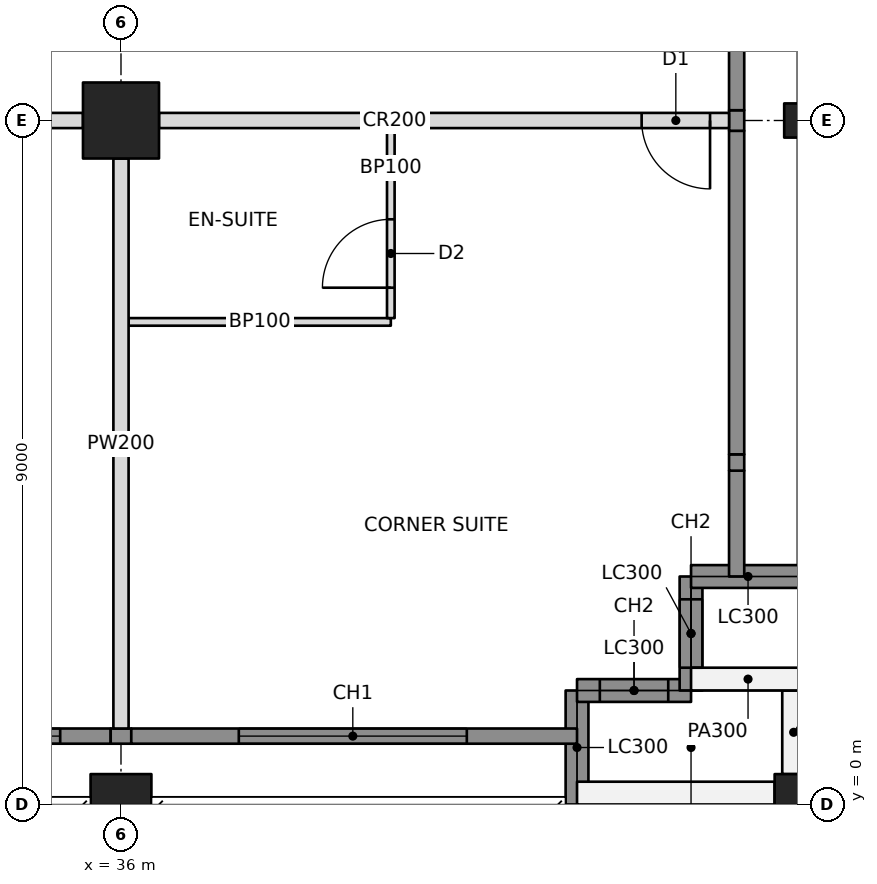
"""IFC4 building model, lengths in metres.
Left out: names, types, materials, properties, quantities, classifications, styles, units other than length and angle.
Written with IfcOpenShell. Run it as: python <this file> out.ifc"""

import sys

from ifc_helpers import new_model, si_unit, direction, frame, frame_2d, origin, origin_2d, place, context, subcontext, project, spatial, rectangle, hollow_rectangle, i_section, extrude, element, fill, save


model = new_model("IFC4")
c1 = context("Model", 3, precision=1e-05, world=origin(), true_north=direction((0.0, 1.0)))
c2 = subcontext(c1, "Body", "Model", "MODEL_VIEW")
j1 = project(units=[si_unit("LENGTHUNIT", "METRE"), si_unit("PLANEANGLEUNIT", "RADIAN")], contexts=[c1])
p1 = place(None, origin())
s1 = spatial("IfcSite", under=j1, at=p1, CompositionType="ELEMENT")
p2 = place(p1, origin())
s2 = spatial("IfcBuilding", under=s1, at=p2, CompositionType="ELEMENT")
p3 = place(p2, frame((0.0, 0.0, 94.2)))
s3 = spatial("IfcBuildingStorey", under=s2, at=p3, CompositionType="ELEMENT", Elevation=94.2)
p4 = place(p3, frame((36.0, 0.0, 0.0), z_axis=(0.0, 0.0, 1.0), x_axis=(1.0, 0.0, 0.0)))
e1 = element("IfcColumn", 1, at=p4, inside=s3, PredefinedType="COLUMN", context=c2, shape_type="SweptSolid", body=[
    extrude(hollow_rectangle(XDim=0.8, YDim=0.8, WallThickness=0.07, at=origin_2d()), origin(), (0.0, 0.0, 1.0), 3.4),
])
p5 = place(p3, frame((36.0, 9.0, 0.0), z_axis=(0.0, 0.0, 1.0), x_axis=(0.0, 1.0, 0.0)))
e2 = element("IfcColumn", 2, at=p5, inside=s3, PredefinedType="COLUMN", context=c2, shape_type="SweptSolid", body=[
    extrude(hollow_rectangle(XDim=1.0, YDim=1.0, WallThickness=0.1, at=origin_2d()), origin(), (0.0, 0.0, 1.0), 3.4),
])
p6 = place(p3, frame((45.0, 0.0, 0.0), z_axis=(0.0, 0.0, 1.0), x_axis=(1.0, 0.0, 0.0)))
e3 = element("IfcColumn", 3, at=p6, inside=s3, PredefinedType="COLUMN", context=c2, shape_type="SweptSolid", body=[
    extrude(hollow_rectangle(XDim=0.8, YDim=0.8, WallThickness=0.07, at=origin_2d()), origin(), (0.0, 0.0, 1.0), 3.4),
])
p7 = place(p3, frame((45.0, 9.0, 0.0), z_axis=(0.0, 0.0, 1.0), x_axis=(0.0, 1.0, 0.0)))
e4 = element("IfcColumn", 4, at=p7, inside=s3, PredefinedType="COLUMN", context=c2, shape_type="SweptSolid", body=[
    extrude(i_section(OverallWidth=0.449, OverallDepth=0.549, WebThickness=0.072, FlangeThickness=0.115, at=origin_2d()), origin(), (0.0, 0.0, 1.0), 3.4),
])
p8 = place(p3, frame((42.0, 0.0, 0.0), z_axis=(0.0, 0.0, 1.0), x_axis=(0.0, 1.0, 0.0)))
e5 = element("IfcWall", 5, at=p8, inside=s3, PredefinedType="SOLIDWALL", context=c2, shape_type="SweptSolid", body=[
    extrude(rectangle(XDim=1.5, YDim=0.3, at=frame_2d((0.75, 0.0))), origin(), (0.0, 0.0, 1.0), 2.42),
])
p9 = place(p3, frame((42.0, 1.5, 0.0), z_axis=(0.0, 0.0, 1.0), x_axis=(1.0, 0.0, 0.0)))
e6 = element("IfcWall", 6, at=p9, inside=s3, PredefinedType="SOLIDWALL", context=c2, shape_type="SweptSolid", body=[
    extrude(rectangle(XDim=1.5, YDim=0.3, at=frame_2d((0.75, 0.0))), origin(), (0.0, 0.0, 1.0), 3.2),
])
p10 = place(p9, frame((0.3, 0.0, 0.6)))
e7 = element("IfcOpeningElement", 7, at=p10, cuts=e6, PredefinedType="OPENING", context=c2, shape_type="SweptSolid", body=[
    extrude(rectangle(XDim=0.9, YDim=2.2, at=frame_2d((0.45, 1.1))), frame((0.0, 0.16, 0.0), z_axis=(0.0, -1.0, 0.0), x_axis=(1.0, 0.0, 0.0)), (0.0, 0.0, 1.0), 0.32),
])
p11 = place(p3, frame((43.5, 1.5, 0.0), z_axis=(0.0, 0.0, 1.0), x_axis=(0.0, 1.0, 0.0)))
e8 = element("IfcWall", 8, at=p11, inside=s3, PredefinedType="SOLIDWALL", context=c2, shape_type="SweptSolid", body=[
    extrude(rectangle(XDim=1.5, YDim=0.3, at=frame_2d((0.75, 0.0))), origin(), (0.0, 0.0, 1.0), 3.2),
])
p12 = place(p11, frame((0.3, 0.0, 0.6)))
e9 = element("IfcOpeningElement", 9, at=p12, cuts=e8, PredefinedType="OPENING", context=c2, shape_type="SweptSolid", body=[
    extrude(rectangle(XDim=0.9, YDim=2.2, at=frame_2d((0.45, 1.1))), frame((0.0, 0.16, 0.0), z_axis=(0.0, -1.0, 0.0), x_axis=(1.0, 0.0, 0.0)), (0.0, 0.0, 1.0), 0.32),
])
p13 = place(p3, frame((43.5, 3.0, 0.0), z_axis=(0.0, 0.0, 1.0), x_axis=(1.0, 0.0, 0.0)))
e10 = element("IfcWall", 10, at=p13, inside=s3, PredefinedType="SOLIDWALL", context=c2, shape_type="SweptSolid", body=[
    extrude(rectangle(XDim=1.5, YDim=0.3, at=frame_2d((0.75, 0.0))), origin(), (0.0, 0.0, 1.0), 2.42),
])
p14 = place(p3, frame((44.1, 3.0, 0.0), z_axis=(0.0, 0.0, 1.0), x_axis=(0.0, 1.0, 0.0)))
e11 = element("IfcWall", 11, at=p14, inside=s3, PredefinedType="SOLIDWALL", context=c2, shape_type="SweptSolid", body=[
    extrude(rectangle(XDim=1.393, YDim=0.2, at=frame_2d((0.696, 0.0))), origin(), (0.0, 0.0, 1.0), 3.2),
])
p15 = place(p3, frame((44.6, 0.15, 0.0), z_axis=(0.0, 0.0, 1.0), x_axis=(-1.0, 0.0, 0.0)))
e12 = element("IfcWall", 12, at=p15, inside=s3, PredefinedType="PARAPET", context=c2, shape_type="SweptSolid", body=[
    extrude(rectangle(XDim=2.6, YDim=0.3, at=frame_2d((1.3, 0.0))), origin(), (0.0, 0.0, 1.0), 1.1),
])
p16 = place(p3, frame((44.85, 1.5, 0.0), z_axis=(0.0, 0.0, 1.0), x_axis=(0.0, -1.0, 0.0)))
e13 = element("IfcWall", 13, at=p16, inside=s3, PredefinedType="PARAPET", context=c2, shape_type="SweptSolid", body=[
    extrude(rectangle(XDim=1.1, YDim=0.3, at=frame_2d((0.55, 0.0))), origin(), (0.0, 0.0, 1.0), 1.1),
])
p17 = place(p3, frame((45.0, 1.65, 0.0), z_axis=(0.0, 0.0, 1.0), x_axis=(-1.0, 0.0, 0.0)))
e14 = element("IfcWall", 14, at=p17, inside=s3, PredefinedType="PARAPET", context=c2, shape_type="SweptSolid", body=[
    extrude(rectangle(XDim=1.5, YDim=0.3, at=frame_2d((0.75, 0.0))), origin(), (0.0, 0.0, 1.0), 1.1),
])
p18 = place(p3, frame((27.5, 9.0, 0.0), z_axis=(0.0, 0.0, 1.0), x_axis=(1.0, 0.0, 0.0)))
e15 = element("IfcWall", 15, at=p18, inside=s3, PredefinedType="PARTITIONING", context=c2, shape_type="SweptSolid", body=[
    extrude(rectangle(XDim=8.0, YDim=0.2, at=frame_2d((4.0, 0.0))), origin(), (0.0, 0.0, 1.0), 2.405),
])
p19 = place(p18, frame((0.85, 0.0, 0.0)))
e16 = element("IfcOpeningElement", 16, at=p19, cuts=e15, PredefinedType="OPENING", context=c2, shape_type="SweptSolid", body=[
    extrude(rectangle(XDim=1.8, YDim=2.4, at=frame_2d((0.9, 1.2))), frame((0.0, 0.11, 0.0), z_axis=(0.0, -1.0, 0.0), x_axis=(1.0, 0.0, 0.0)), (0.0, 0.0, 1.0), 0.22),
])
p20 = place(p18, frame((5.35, 0.0, 0.0)))
e17 = element("IfcOpeningElement", 17, at=p20, cuts=e15, PredefinedType="OPENING", context=c2, shape_type="SweptSolid", body=[
    extrude(rectangle(XDim=1.8, YDim=2.4, at=frame_2d((0.9, 1.2))), frame((0.0, 0.11, 0.0), z_axis=(0.0, -1.0, 0.0), x_axis=(1.0, 0.0, 0.0)), (0.0, 0.0, 1.0), 0.22),
])
p21 = place(p3, frame((36.5, 9.0, 0.0), z_axis=(0.0, 0.0, 1.0), x_axis=(1.0, 0.0, 0.0)))
e18 = element("IfcWall", 18, at=p21, inside=s3, PredefinedType="PARTITIONING", context=c2, shape_type="SweptSolid", body=[
    extrude(rectangle(XDim=7.5, YDim=0.2, at=frame_2d((3.75, 0.0))), origin(), (0.0, 0.0, 1.0), 2.438),
])
p22 = place(p21, frame((6.35, 0.0, 0.0)))
e19 = element("IfcOpeningElement", 19, at=p22, cuts=e18, PredefinedType="OPENING", context=c2, shape_type="SweptSolid", body=[
    extrude(rectangle(XDim=0.9, YDim=2.1, at=frame_2d((0.45, 1.05))), frame((0.0, 0.11, 0.0), z_axis=(0.0, -1.0, 0.0), x_axis=(1.0, 0.0, 0.0)), (0.0, 0.0, 1.0), 0.22),
])
p23 = place(p3, frame((36.0, 8.5, 0.0), z_axis=(0.0, 0.0, 1.0), x_axis=(0.0, -1.0, 0.0)))
e20 = element("IfcWall", 20, at=p23, inside=s3, PredefinedType="PARTITIONING", context=c2, shape_type="SweptSolid", body=[
    extrude(rectangle(XDim=7.5, YDim=0.2, at=frame_2d((3.75, 0.0))), origin(), (0.0, 0.0, 1.0), 2.438),
])
p24 = place(p3, frame((36.1, 6.35, 0.0), z_axis=(0.0, 0.0, 1.0), x_axis=(1.0, 0.0, 0.0)))
e21 = element("IfcWall", 21, at=p24, inside=s3, PredefinedType="PARTITIONING", context=c2, shape_type="SweptSolid", body=[
    extrude(rectangle(XDim=3.45, YDim=0.1, at=frame_2d((1.725, 0.0))), origin(), (0.0, 0.0, 1.0), 2.438),
])
p25 = place(p3, frame((39.55, 8.9, 0.0), z_axis=(0.0, 0.0, 1.0), x_axis=(0.0, -1.0, 0.0)))
e22 = element("IfcWall", 22, at=p25, inside=s3, PredefinedType="PARTITIONING", context=c2, shape_type="SweptSolid", body=[
    extrude(rectangle(XDim=2.5, YDim=0.1, at=frame_2d((1.25, 0.0))), origin(), (0.0, 0.0, 1.0), 2.438),
])
p26 = place(p25, frame((1.2, 0.0, 0.0)))
e23 = element("IfcOpeningElement", 23, at=p26, cuts=e22, PredefinedType="OPENING", context=c2, shape_type="SweptSolid", body=[
    extrude(rectangle(XDim=0.9, YDim=2.1, at=frame_2d((0.45, 1.05))), frame((0.0, 0.06, 0.0), z_axis=(0.0, -1.0, 0.0), x_axis=(1.0, 0.0, 0.0)), (0.0, 0.0, 1.0), 0.12),
])
p27 = place(p3, frame((27.194, 0.9, 0.0), z_axis=(0.0, 0.0, 1.0), x_axis=(1.0, 0.0, 0.0)))
e24 = element("IfcWall", 24, at=p27, inside=s3, PredefinedType="SOLIDWALL", context=c2, shape_type="SweptSolid", body=[
    extrude(rectangle(XDim=8.671, YDim=0.2, at=frame_2d((4.335, 0.0))), origin(), (0.0, 0.0, 1.0), 3.2),
])
p28 = place(p27, frame((0.606, 0.0, 0.6)))
e25 = element("IfcOpeningElement", 25, at=p28, cuts=e24, PredefinedType="OPENING", context=c2, shape_type="SweptSolid", body=[
    extrude(rectangle(XDim=3.0, YDim=2.2, at=frame_2d((1.5, 1.1))), frame((0.0, 0.11, 0.0), z_axis=(0.0, -1.0, 0.0), x_axis=(1.0, 0.0, 0.0)), (0.0, 0.0, 1.0), 0.22),
])
p29 = place(p27, frame((5.006, 0.0, 0.6)))
e26 = element("IfcOpeningElement", 26, at=p29, cuts=e24, PredefinedType="OPENING", context=c2, shape_type="SweptSolid", body=[
    extrude(rectangle(XDim=3.0, YDim=2.2, at=frame_2d((1.5, 1.1))), frame((0.0, 0.11, 0.0), z_axis=(0.0, -1.0, 0.0), x_axis=(1.0, 0.0, 0.0)), (0.0, 0.0, 1.0), 0.22),
])
p30 = place(p3, frame((35.865, 0.9, 0.0), z_axis=(0.0, 0.0, 1.0), x_axis=(1.0, 0.0, 0.0)))
e27 = element("IfcWall", 27, at=p30, inside=s3, PredefinedType="SOLIDWALL", context=c2, shape_type="SweptSolid", body=[
    extrude(rectangle(XDim=0.271, YDim=0.2, at=frame_2d((0.135, 0.0))), origin(), (0.0, 0.0, 1.0), 2.438),
])
p31 = place(p3, frame((36.135, 0.9, 0.0), z_axis=(0.0, 0.0, 1.0), x_axis=(1.0, 0.0, 0.0)))
e28 = element("IfcWall", 28, at=p31, inside=s3, PredefinedType="SOLIDWALL", context=c2, shape_type="SweptSolid", body=[
    extrude(rectangle(XDim=5.865, YDim=0.2, at=frame_2d((2.932, 0.0))), origin(), (0.0, 0.0, 1.0), 3.2),
])
p32 = place(p31, frame((1.415, 0.0, 0.6)))
e29 = element("IfcOpeningElement", 29, at=p32, cuts=e28, PredefinedType="OPENING", context=c2, shape_type="SweptSolid", body=[
    extrude(rectangle(XDim=3.0, YDim=2.2, at=frame_2d((1.5, 1.1))), frame((0.0, 0.11, 0.0), z_axis=(0.0, -1.0, 0.0), x_axis=(1.0, 0.0, 0.0)), (0.0, 0.0, 1.0), 0.22),
])
p33 = place(p3, frame((44.1, 4.393, 0.0), z_axis=(0.0, 0.0, 1.0), x_axis=(0.0, 1.0, 0.0)))
e30 = element("IfcWall", 30, at=p33, inside=s3, PredefinedType="SOLIDWALL", context=c2, shape_type="SweptSolid", body=[
    extrude(rectangle(XDim=0.215, YDim=0.2, at=frame_2d((0.107, 0.0))), origin(), (0.0, 0.0, 1.0), 2.661),
])
p34 = place(p3, frame((44.1, 4.607, 0.0), z_axis=(0.0, 0.0, 1.0), x_axis=(0.0, 1.0, 0.0)))
e31 = element("IfcWall", 31, at=p34, inside=s3, PredefinedType="SOLIDWALL", context=c2, shape_type="SweptSolid", body=[
    extrude(rectangle(XDim=4.257, YDim=0.2, at=frame_2d((2.129, 0.0))), origin(), (0.0, 0.0, 1.0), 3.2),
])
p35 = place(p3, frame((44.1, 8.865, 0.0), z_axis=(0.0, 0.0, 1.0), x_axis=(0.0, 1.0, 0.0)))
e32 = element("IfcWall", 32, at=p35, inside=s3, PredefinedType="SOLIDWALL", context=c2, shape_type="SweptSolid", body=[
    extrude(rectangle(XDim=0.271, YDim=0.2, at=frame_2d((0.135, 0.0))), origin(), (0.0, 0.0, 1.0), 2.438),
])
p36 = place(p3, frame((44.1, 9.135, 0.0), z_axis=(0.0, 0.0, 1.0), x_axis=(0.0, 1.0, 0.0)))
e33 = element("IfcWall", 33, at=p36, inside=s3, PredefinedType="SOLIDWALL", context=c2, shape_type="SweptSolid", body=[
    extrude(rectangle(XDim=8.671, YDim=0.2, at=frame_2d((4.335, 0.0))), origin(), (0.0, 0.0, 1.0), 3.2),
])
p37 = place(p36, frame((2.015, 0.0, 0.6)))
e34 = element("IfcOpeningElement", 34, at=p37, cuts=e33, PredefinedType="OPENING", context=c2, shape_type="SweptSolid", body=[
    extrude(rectangle(XDim=3.0, YDim=2.2, at=frame_2d((1.5, 1.1))), frame((0.0, 0.11, 0.0), z_axis=(0.0, -1.0, 0.0), x_axis=(1.0, 0.0, 0.0)), (0.0, 0.0, 1.0), 0.22),
])
p38 = place(p36, frame((5.515, 0.0, 0.6)))
e35 = element("IfcOpeningElement", 35, at=p38, cuts=e33, PredefinedType="OPENING", context=c2, shape_type="SweptSolid", body=[
    extrude(rectangle(XDim=3.0, YDim=2.2, at=frame_2d((1.5, 1.1))), frame((0.0, 0.11, 0.0), z_axis=(0.0, -1.0, 0.0), x_axis=(1.0, 0.0, 0.0)), (0.0, 0.0, 1.0), 0.22),
])
p39 = place(p10, origin())
e36 = element("IfcWindow", 36, at=p39, inside=s3, PartitioningType="SINGLE_PANEL", PredefinedType="WINDOW", context=c2, shape_type="SweptSolid", body=[
    extrude(rectangle(XDim=0.9, YDim=2.2, at=frame_2d((0.45, 1.1))), frame((0.0, 0.03, 0.0), z_axis=(0.0, -1.0, 0.0), x_axis=(1.0, 0.0, 0.0)), (0.0, 0.0, 1.0), 0.06),
])
fill(e7, e36)
p40 = place(p12, origin())
e37 = element("IfcWindow", 37, at=p40, inside=s3, PartitioningType="SINGLE_PANEL", PredefinedType="WINDOW", context=c2, shape_type="SweptSolid", body=[
    extrude(rectangle(XDim=0.9, YDim=2.2, at=frame_2d((0.45, 1.1))), frame((0.0, 0.03, 0.0), z_axis=(0.0, -1.0, 0.0), x_axis=(1.0, 0.0, 0.0)), (0.0, 0.0, 1.0), 0.06),
])
fill(e9, e37)
p41 = place(p29, origin())
e38 = element("IfcWindow", 38, at=p41, inside=s3, PartitioningType="TRIPLE_PANEL_VERTICAL", PredefinedType="WINDOW", context=c2, shape_type="SweptSolid", body=[
    extrude(rectangle(XDim=3.0, YDim=2.2, at=frame_2d((1.5, 1.1))), frame((0.0, 0.03, 0.0), z_axis=(0.0, -1.0, 0.0), x_axis=(1.0, 0.0, 0.0)), (0.0, 0.0, 1.0), 0.06),
])
fill(e26, e38)
p42 = place(p32, origin())
e39 = element("IfcWindow", 39, at=p42, inside=s3, PartitioningType="TRIPLE_PANEL_VERTICAL", PredefinedType="WINDOW", context=c2, shape_type="SweptSolid", body=[
    extrude(rectangle(XDim=3.0, YDim=2.2, at=frame_2d((1.5, 1.1))), frame((0.0, 0.03, 0.0), z_axis=(0.0, -1.0, 0.0), x_axis=(1.0, 0.0, 0.0)), (0.0, 0.0, 1.0), 0.06),
])
fill(e29, e39)
p43 = place(p26, frame((0.9, 0.0, 0.0), z_axis=(0.0, 0.0, 1.0), x_axis=(-1.0, 0.0, 0.0)))
e40 = element("IfcDoor", 40, at=p43, inside=s3, OperationType="SINGLE_SWING_LEFT", PredefinedType="DOOR", context=c2, shape_type="SweptSolid", body=[
    extrude(rectangle(XDim=0.9, YDim=2.1, at=frame_2d((0.45, 1.05))), frame((0.0, 0.025, 0.0), z_axis=(0.0, -1.0, 0.0), x_axis=(1.0, 0.0, 0.0)), (0.0, 0.0, 1.0), 0.05),
])
fill(e23, e40)
p44 = place(p22, frame((0.9, 0.0, 0.0), z_axis=(0.0, 0.0, 1.0), x_axis=(-1.0, 0.0, 0.0)))
e41 = element("IfcDoor", 41, at=p44, inside=s3, OperationType="SINGLE_SWING_LEFT", PredefinedType="DOOR", context=c2, shape_type="SweptSolid", body=[
    extrude(rectangle(XDim=0.9, YDim=2.1, at=frame_2d((0.45, 1.05))), frame((0.0, 0.025, 0.0), z_axis=(0.0, -1.0, 0.0), x_axis=(1.0, 0.0, 0.0)), (0.0, 0.0, 1.0), 0.05),
])
fill(e19, e41)
save(model, sys.argv[1])
